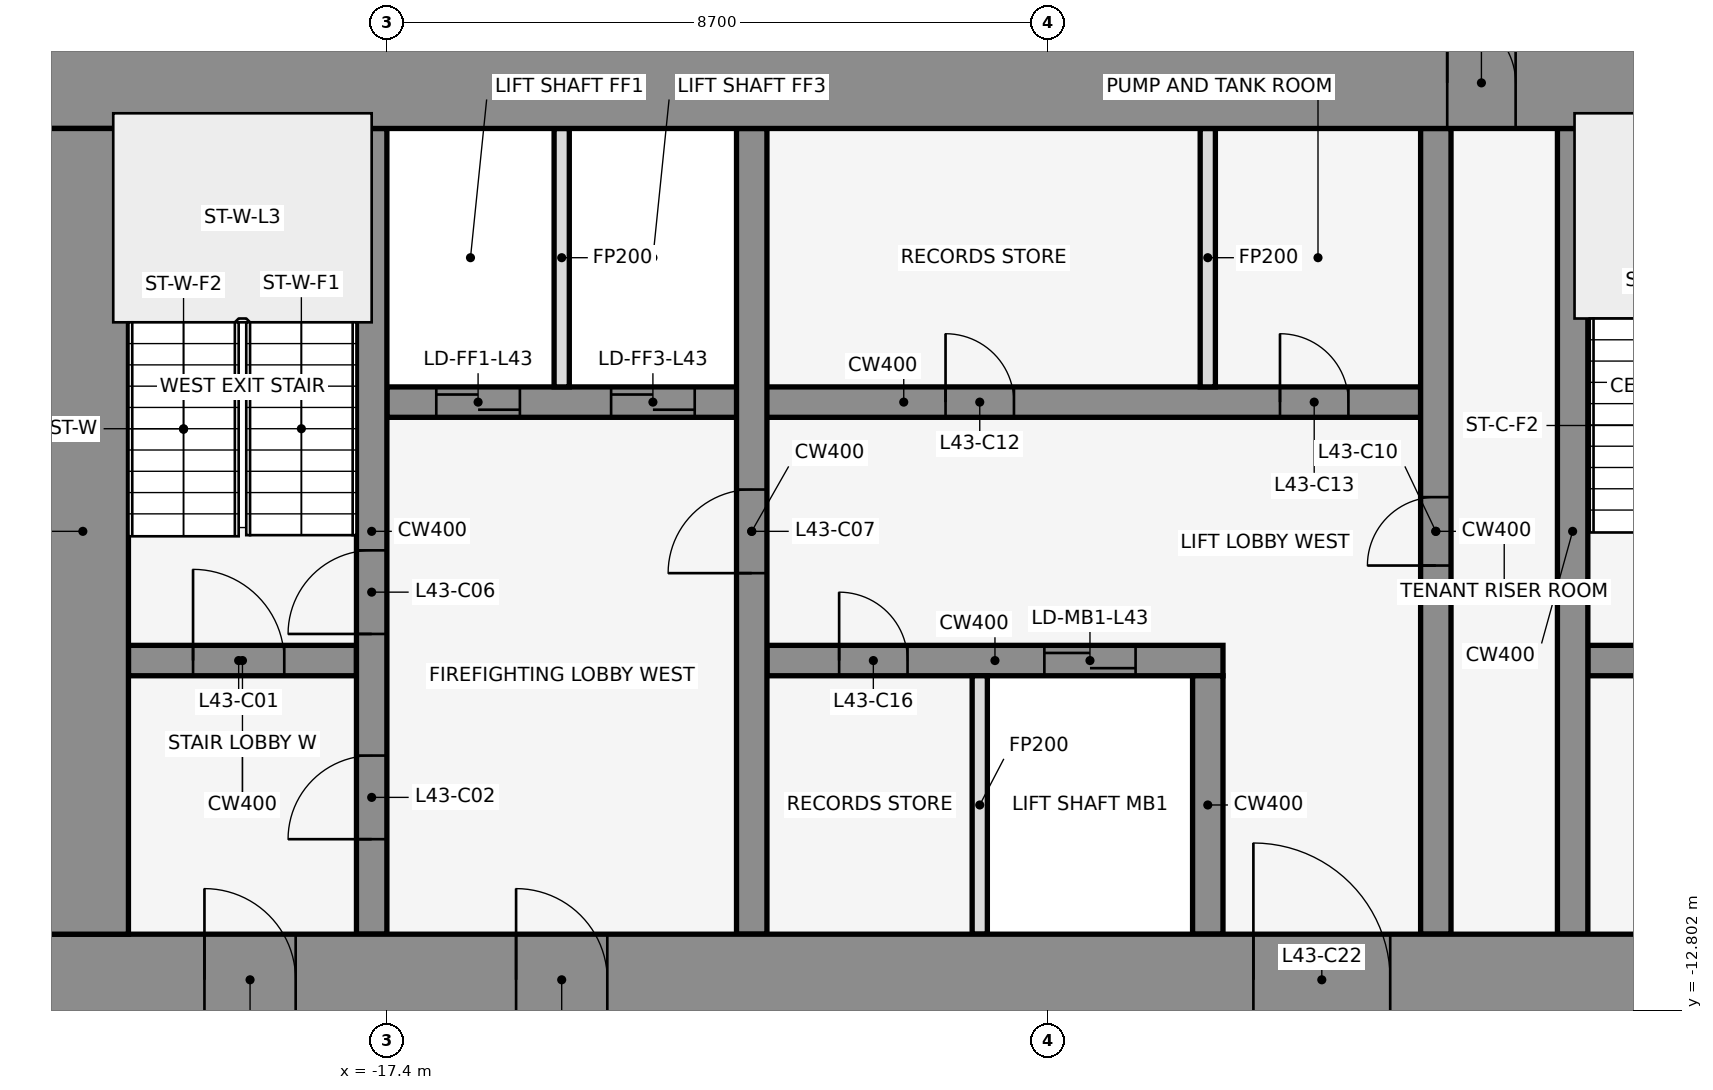
"""IFC4 building model, lengths in metres.
Left out: names, types, materials, properties, quantities, classifications, styles, units other than length and angle.
Written with IfcOpenShell. Run it as: python <this file> out.ifc"""

import sys

from ifc_helpers import new_model, si_unit, direction, frame, frame_2d, origin, place, context, subcontext, project, spatial, rectangle, extrude, element, fill, save


model = new_model("IFC4")
c1 = context("Model", 3, precision=1e-05, world=origin(), true_north=direction((0.0, 1.0)))
c2 = subcontext(c1, "Body", "Model", "MODEL_VIEW")
j1 = project(units=[si_unit("LENGTHUNIT", "METRE"), si_unit("PLANEANGLEUNIT", "RADIAN")], contexts=[c1])
p1 = place(None, origin())
s1 = spatial("IfcSite", under=j1, at=p1, CompositionType="ELEMENT")
p2 = place(p1, origin())
s2 = spatial("IfcBuilding", under=s1, at=p2, CompositionType="ELEMENT")
p3 = place(p2, frame((0.0, 0.0, 195.0)))
s3 = spatial("IfcBuildingStorey", under=s2, at=p3, CompositionType="ELEMENT", Elevation=195.0)
for number, where, z_axis, x_axis in (
    (1, (-0.068, -0.105, 0.0), (0.0, 0.0, 1.0), (-0.84, 0.543, 0.0)),
    (2, (-14.599, 1.08, 0.0), (0.0, 0.0, 1.0), (-0.84, -0.543, 0.0)),
):
    element("IfcWall", number, at=place(p3, frame(where, z_axis=z_axis, x_axis=x_axis)), inside=s3, PredefinedType="STANDARD", context=c2, shape_type="SweptSolid", body=[
        extrude(rectangle(XDim=2.183, YDim=0.25, at=frame_2d((1.091, 0.0))), origin(), (0.0, 0.0, 1.0), 3.95),
    ])
p4 = place(p3, frame((-20.8, -8.2, 0.0), z_axis=(0.0, 0.0, 1.0), x_axis=(1.0, 0.0, 0.0)))
e3 = element("IfcWall", 3, at=p4, inside=s3, PredefinedType="SHEAR", context=c2, shape_type="SweptSolid", body=[
    extrude(rectangle(XDim=3.0, YDim=0.4, at=frame_2d((1.5, 0.0))), origin(), (0.0, 0.0, 1.0), 4.1),
])
p5 = place(p4, frame((0.85, 0.0, 0.0)))
e4 = element("IfcOpeningElement", 4, at=p5, cuts=e3, PredefinedType="OPENING", context=c2, shape_type="SweptSolid", body=[
    extrude(rectangle(XDim=1.2, YDim=2.1, at=frame_2d((0.6, 1.05))), frame((0.0, 0.212, 0.0), z_axis=(0.0, -1.0, 0.0), x_axis=(1.0, 0.0, 0.0)), (0.0, 0.0, 1.0), 0.424),
])
p6 = place(p3, frame((-12.4, -8.2, 0.0), z_axis=(0.0, 0.0, 1.0), x_axis=(1.0, 0.0, 0.0)))
e5 = element("IfcWall", 5, at=p6, inside=s3, PredefinedType="SHEAR", context=c2, shape_type="SweptSolid", body=[
    extrude(rectangle(XDim=6.0, YDim=0.4, at=frame_2d((3.0, 0.0))), origin(), (0.0, 0.0, 1.0), 4.1),
])
p7 = place(p6, frame((3.65, 0.0, 0.0)))
e6 = element("IfcOpeningElement", 6, at=p7, cuts=e5, PredefinedType="OPENING", context=c2, shape_type="SweptSolid", body=[
    extrude(rectangle(XDim=1.2, YDim=2.1, at=frame_2d((0.6, 1.05))), frame((0.0, 0.212, 0.0), z_axis=(0.0, -1.0, 0.0), x_axis=(1.0, 0.0, 0.0)), (0.0, 0.0, 1.0), 0.424),
])
p8 = place(p6, frame((0.95, 0.0, 0.0)))
e7 = element("IfcOpeningElement", 7, at=p8, cuts=e5, PredefinedType="OPENING", context=c2, shape_type="SweptSolid", body=[
    extrude(rectangle(XDim=0.9, YDim=2.1, at=frame_2d((0.45, 1.05))), frame((0.0, 0.212, 0.0), z_axis=(0.0, -1.0, 0.0), x_axis=(1.0, 0.0, 0.0)), (0.0, 0.0, 1.0), 0.424),
])
p9 = place(p3, frame((-1.6, -8.2, 0.0), z_axis=(0.0, 0.0, 1.0), x_axis=(1.0, 0.0, 0.0)))
e8 = element("IfcWall", 8, at=p9, inside=s3, PredefinedType="SHEAR", context=c2, shape_type="SweptSolid", body=[
    extrude(rectangle(XDim=3.2, YDim=0.4, at=frame_2d((1.6, 0.0))), origin(), (0.0, 0.0, 1.0), 4.1),
])
p10 = place(p9, frame((1.05, 0.0, 0.0)))
e9 = element("IfcOpeningElement", 9, at=p10, cuts=e8, PredefinedType="OPENING", context=c2, shape_type="SweptSolid", body=[
    extrude(rectangle(XDim=1.2, YDim=2.1, at=frame_2d((0.6, 1.05))), frame((0.0, 0.212, 0.0), z_axis=(0.0, -1.0, 0.0), x_axis=(1.0, 0.0, 0.0)), (0.0, 0.0, 1.0), 0.424),
])
p11 = place(p3, frame((-17.4, -4.8, 0.0), z_axis=(0.0, 0.0, 1.0), x_axis=(1.0, 0.0, 0.0)))
e10 = element("IfcWall", 10, at=p11, inside=s3, PredefinedType="SHEAR", context=c2, shape_type="SweptSolid", body=[
    extrude(rectangle(XDim=13.6, YDim=0.4, at=frame_2d((6.8, 0.0))), origin(), (0.0, 0.0, 1.0), 4.1),
])
p12 = place(p11, frame((0.65, 0.0, 0.0)))
e11 = element("IfcOpeningElement", 11, at=p12, cuts=e10, PredefinedType="OPENING", context=c2, shape_type="SweptSolid", body=[
    extrude(rectangle(XDim=1.1, YDim=2.1, at=frame_2d((0.55, 1.05))), frame((0.0, 0.212, 0.0), z_axis=(0.0, -1.0, 0.0), x_axis=(1.0, 0.0, 0.0)), (0.0, 0.0, 1.0), 0.424),
])
p13 = place(p11, frame((2.95, 0.0, 0.0)))
e12 = element("IfcOpeningElement", 12, at=p13, cuts=e10, PredefinedType="OPENING", context=c2, shape_type="SweptSolid", body=[
    extrude(rectangle(XDim=1.1, YDim=2.1, at=frame_2d((0.55, 1.05))), frame((0.0, 0.212, 0.0), z_axis=(0.0, -1.0, 0.0), x_axis=(1.0, 0.0, 0.0)), (0.0, 0.0, 1.0), 0.424),
])
p14 = place(p11, frame((7.35, 0.0, 0.0)))
e13 = element("IfcOpeningElement", 13, at=p14, cuts=e10, PredefinedType="OPENING", context=c2, shape_type="SweptSolid", body=[
    extrude(rectangle(XDim=0.9, YDim=2.1, at=frame_2d((0.45, 1.05))), frame((0.0, 0.212, 0.0), z_axis=(0.0, -1.0, 0.0), x_axis=(1.0, 0.0, 0.0)), (0.0, 0.0, 1.0), 0.424),
])
p15 = place(p11, frame((11.75, 0.0, 0.0)))
e14 = element("IfcOpeningElement", 14, at=p15, cuts=e10, PredefinedType="OPENING", context=c2, shape_type="SweptSolid", body=[
    extrude(rectangle(XDim=0.9, YDim=2.1, at=frame_2d((0.45, 1.05))), frame((0.0, 0.212, 0.0), z_axis=(0.0, -1.0, 0.0), x_axis=(1.0, 0.0, 0.0)), (0.0, 0.0, 1.0), 0.424),
])
p16 = place(p3, frame((-17.6, -11.8, 0.0), z_axis=(0.0, 0.0, 1.0), x_axis=(0.0, 1.0, 0.0)))
e15 = element("IfcWall", 15, at=p16, inside=s3, PredefinedType="SHEAR", context=c2, shape_type="SweptSolid", body=[
    extrude(rectangle(XDim=10.6, YDim=0.4, at=frame_2d((5.3, 0.0))), origin(), (0.0, 0.0, 1.0), 4.1),
])
p17 = place(p16, frame((1.25, 0.0, 0.0)))
e16 = element("IfcOpeningElement", 16, at=p17, cuts=e15, PredefinedType="OPENING", context=c2, shape_type="SweptSolid", body=[
    extrude(rectangle(XDim=1.1, YDim=2.1, at=frame_2d((0.55, 1.05))), frame((0.0, 0.212, 0.0), z_axis=(0.0, -1.0, 0.0), x_axis=(1.0, 0.0, 0.0)), (0.0, 0.0, 1.0), 0.424),
])
p18 = place(p16, frame((3.95, 0.0, 0.0)))
e17 = element("IfcOpeningElement", 17, at=p18, cuts=e15, PredefinedType="OPENING", context=c2, shape_type="SweptSolid", body=[
    extrude(rectangle(XDim=1.1, YDim=2.1, at=frame_2d((0.55, 1.05))), frame((0.0, 0.212, 0.0), z_axis=(0.0, -1.0, 0.0), x_axis=(1.0, 0.0, 0.0)), (0.0, 0.0, 1.0), 0.424),
])
p19 = place(p3, frame((-15.1, -4.6, 0.0), z_axis=(0.0, 0.0, 1.0), x_axis=(0.0, 1.0, 0.0)))
e18 = element("IfcWall", 18, at=p19, inside=s3, PredefinedType="PARTITIONING", context=c2, shape_type="SweptSolid", body=[
    extrude(rectangle(XDim=3.4, YDim=0.2, at=frame_2d((1.7, 0.0))), origin(), (0.0, 0.0, 1.0), 2.84),
])
p20 = place(p3, frame((-12.6, -11.8, 0.0), z_axis=(0.0, 0.0, 1.0), x_axis=(0.0, 1.0, 0.0)))
e19 = element("IfcWall", 19, at=p20, inside=s3, PredefinedType="SHEAR", context=c2, shape_type="SweptSolid", body=[
    extrude(rectangle(XDim=10.6, YDim=0.4, at=frame_2d((5.3, 0.0))), origin(), (0.0, 0.0, 1.0), 4.1),
])
p21 = place(p20, frame((4.75, 0.0, 0.0)))
e20 = element("IfcOpeningElement", 20, at=p21, cuts=e19, PredefinedType="OPENING", context=c2, shape_type="SweptSolid", body=[
    extrude(rectangle(XDim=1.1, YDim=2.1, at=frame_2d((0.55, 1.05))), frame((0.0, 0.212, 0.0), z_axis=(0.0, -1.0, 0.0), x_axis=(1.0, 0.0, 0.0)), (0.0, 0.0, 1.0), 0.424),
])
p22 = place(p3, frame((-9.6, -11.8, 0.0), z_axis=(0.0, 0.0, 1.0), x_axis=(0.0, 1.0, 0.0)))
e21 = element("IfcWall", 21, at=p22, inside=s3, PredefinedType="PARTITIONING", context=c2, shape_type="SweptSolid", body=[
    extrude(rectangle(XDim=3.4, YDim=0.2, at=frame_2d((1.7, 0.0))), origin(), (0.0, 0.0, 1.0), 2.84),
])
p23 = place(p3, frame((-6.6, -11.8, 0.0), z_axis=(0.0, 0.0, 1.0), x_axis=(0.0, 1.0, 0.0)))
e22 = element("IfcWall", 22, at=p23, inside=s3, PredefinedType="SHEAR", context=c2, shape_type="SweptSolid", body=[
    extrude(rectangle(XDim=3.4, YDim=0.4, at=frame_2d((1.7, 0.0))), origin(), (0.0, 0.0, 1.0), 4.1),
])
p24 = place(p3, frame((-6.6, -4.6, 0.0), z_axis=(0.0, 0.0, 1.0), x_axis=(0.0, 1.0, 0.0)))
e23 = element("IfcWall", 23, at=p24, inside=s3, PredefinedType="PARTITIONING", context=c2, shape_type="SweptSolid", body=[
    extrude(rectangle(XDim=3.4, YDim=0.2, at=frame_2d((1.7, 0.0))), origin(), (0.0, 0.0, 1.0), 2.84),
])
p25 = place(p3, frame((-3.6, -11.8, 0.0), z_axis=(0.0, 0.0, 1.0), x_axis=(0.0, 1.0, 0.0)))
e24 = element("IfcWall", 24, at=p25, inside=s3, PredefinedType="SHEAR", context=c2, shape_type="SweptSolid", body=[
    extrude(rectangle(XDim=10.6, YDim=0.4, at=frame_2d((5.3, 0.0))), origin(), (0.0, 0.0, 1.0), 4.1),
])
p26 = place(p25, frame((4.85, 0.0, 0.0)))
e25 = element("IfcOpeningElement", 25, at=p26, cuts=e24, PredefinedType="OPENING", context=c2, shape_type="SweptSolid", body=[
    extrude(rectangle(XDim=0.9, YDim=2.1, at=frame_2d((0.45, 1.05))), frame((0.0, 0.212, 0.0), z_axis=(0.0, -1.0, 0.0), x_axis=(1.0, 0.0, 0.0)), (0.0, 0.0, 1.0), 0.424),
])
p27 = place(p3, frame((-1.8, -11.8, 0.0), z_axis=(0.0, 0.0, 1.0), x_axis=(0.0, 1.0, 0.0)))
e26 = element("IfcWall", 26, at=p27, inside=s3, PredefinedType="SHEAR", context=c2, shape_type="SweptSolid", body=[
    extrude(rectangle(XDim=10.6, YDim=0.4, at=frame_2d((5.3, 0.0))), origin(), (0.0, 0.0, 1.0), 4.1),
])
p28 = place(p3, frame((-22.0, -0.6, 0.0), z_axis=(0.0, 0.0, 1.0), x_axis=(1.0, 0.0, 0.0)))
e27 = element("IfcWall", 27, at=p28, inside=s3, PredefinedType="SHEAR", context=c2, shape_type="SweptSolid", body=[
    extrude(rectangle(XDim=44.0, YDim=1.2, at=frame_2d((22.0, 0.0))), origin(), (0.0, 0.0, 1.0), 4.1),
])
p29 = place(p28, frame((18.55, 0.0, 0.0)))
e28 = element("IfcOpeningElement", 28, at=p29, cuts=e27, PredefinedType="OPENING", context=c2, shape_type="SweptSolid", body=[
    extrude(rectangle(XDim=0.9, YDim=2.1, at=frame_2d((0.45, 1.05))), frame((0.0, 0.612, 0.0), z_axis=(0.0, -1.0, 0.0), x_axis=(1.0, 0.0, 0.0)), (0.0, 0.0, 1.0), 1.224),
])
p30 = place(p28, frame((24.55, 0.0, 0.0)))
e29 = element("IfcOpeningElement", 29, at=p30, cuts=e27, PredefinedType="OPENING", context=c2, shape_type="SweptSolid", body=[
    extrude(rectangle(XDim=0.9, YDim=2.1, at=frame_2d((0.45, 1.05))), frame((0.0, 0.612, 0.0), z_axis=(0.0, -1.0, 0.0), x_axis=(1.0, 0.0, 0.0)), (0.0, 0.0, 1.0), 1.224),
])
p31 = place(p3, frame((-22.0, -12.4, 0.0), z_axis=(0.0, 0.0, 1.0), x_axis=(1.0, 0.0, 0.0)))
e30 = element("IfcWall", 30, at=p31, inside=s3, PredefinedType="SHEAR", context=c2, shape_type="SweptSolid", body=[
    extrude(rectangle(XDim=44.0, YDim=1.2, at=frame_2d((22.0, 0.0))), origin(), (0.0, 0.0, 1.0), 4.1),
])
p32 = place(p31, frame((2.2, 0.0, 0.0)))
e31 = element("IfcOpeningElement", 31, at=p32, cuts=e30, PredefinedType="OPENING", context=c2, shape_type="SweptSolid", body=[
    extrude(rectangle(XDim=1.2, YDim=2.1, at=frame_2d((0.6, 1.05))), frame((0.0, 0.612, 0.0), z_axis=(0.0, -1.0, 0.0), x_axis=(1.0, 0.0, 0.0)), (0.0, 0.0, 1.0), 1.224),
])
p33 = place(p31, frame((21.4, 0.0, 0.0)))
e32 = element("IfcOpeningElement", 32, at=p33, cuts=e30, PredefinedType="OPENING", context=c2, shape_type="SweptSolid", body=[
    extrude(rectangle(XDim=1.2, YDim=2.1, at=frame_2d((0.6, 1.05))), frame((0.0, 0.612, 0.0), z_axis=(0.0, -1.0, 0.0), x_axis=(1.0, 0.0, 0.0)), (0.0, 0.0, 1.0), 1.224),
])
p34 = place(p31, frame((40.6, 0.0, 0.0)))
e33 = element("IfcOpeningElement", 33, at=p34, cuts=e30, PredefinedType="OPENING", context=c2, shape_type="SweptSolid", body=[
    extrude(rectangle(XDim=1.2, YDim=2.1, at=frame_2d((0.6, 1.05))), frame((0.0, 0.612, 0.0), z_axis=(0.0, -1.0, 0.0), x_axis=(1.0, 0.0, 0.0)), (0.0, 0.0, 1.0), 1.224),
])
p35 = place(p31, frame((16.0, 0.0, 0.0)))
e34 = element("IfcOpeningElement", 34, at=p35, cuts=e30, PredefinedType="OPENING", context=c2, shape_type="SweptSolid", body=[
    extrude(rectangle(XDim=1.8, YDim=2.1, at=frame_2d((0.9, 1.05))), frame((0.0, 0.612, 0.0), z_axis=(0.0, -1.0, 0.0), x_axis=(1.0, 0.0, 0.0)), (0.0, 0.0, 1.0), 1.224),
])
p36 = place(p31, frame((6.3, 0.0, 0.0)))
e35 = element("IfcOpeningElement", 35, at=p36, cuts=e30, PredefinedType="OPENING", context=c2, shape_type="SweptSolid", body=[
    extrude(rectangle(XDim=1.2, YDim=2.1, at=frame_2d((0.6, 1.05))), frame((0.0, 0.612, 0.0), z_axis=(0.0, -1.0, 0.0), x_axis=(1.0, 0.0, 0.0)), (0.0, 0.0, 1.0), 1.224),
])
p37 = place(p31, frame((26.2, 0.0, 0.0)))
e36 = element("IfcOpeningElement", 36, at=p37, cuts=e30, PredefinedType="OPENING", context=c2, shape_type="SweptSolid", body=[
    extrude(rectangle(XDim=1.8, YDim=2.1, at=frame_2d((0.9, 1.05))), frame((0.0, 0.612, 0.0), z_axis=(0.0, -1.0, 0.0), x_axis=(1.0, 0.0, 0.0)), (0.0, 0.0, 1.0), 1.224),
])
p38 = place(p31, frame((36.5, 0.0, 0.0)))
e37 = element("IfcOpeningElement", 37, at=p38, cuts=e30, PredefinedType="OPENING", context=c2, shape_type="SweptSolid", body=[
    extrude(rectangle(XDim=1.2, YDim=2.1, at=frame_2d((0.6, 1.05))), frame((0.0, 0.612, 0.0), z_axis=(0.0, -1.0, 0.0), x_axis=(1.0, 0.0, 0.0)), (0.0, 0.0, 1.0), 1.224),
])
p39 = place(p3, frame((-21.4, -11.8, 0.0), z_axis=(0.0, 0.0, 1.0), x_axis=(0.0, 1.0, 0.0)))
e38 = element("IfcWall", 38, at=p39, inside=s3, PredefinedType="SHEAR", context=c2, shape_type="SweptSolid", body=[
    extrude(rectangle(XDim=10.6, YDim=1.2, at=frame_2d((5.3, 0.0))), origin(), (0.0, 0.0, 1.0), 4.1),
])
p40 = place(p5, origin())
e39 = element("IfcDoor", 39, at=p40, inside=s3, OperationType="SINGLE_SWING_LEFT", PredefinedType="DOOR", context=c2, shape_type="SweptSolid", body=[
    extrude(rectangle(XDim=1.2, YDim=2.1, at=frame_2d((0.6, 1.05))), frame((0.0, 0.025, 0.0), z_axis=(0.0, -1.0, 0.0), x_axis=(1.0, 0.0, 0.0)), (0.0, 0.0, 1.0), 0.05),
])
fill(e4, e39)
p41 = place(p17, frame((1.1, 0.0, 0.0), z_axis=(0.0, 0.0, 1.0), x_axis=(-1.0, 0.0, 0.0)))
e40 = element("IfcDoor", 40, at=p41, inside=s3, OperationType="SINGLE_SWING_LEFT", PredefinedType="DOOR", context=c2, shape_type="SweptSolid", body=[
    extrude(rectangle(XDim=1.1, YDim=2.1, at=frame_2d((0.55, 1.05))), frame((0.0, 0.025, 0.0), z_axis=(0.0, -1.0, 0.0), x_axis=(1.0, 0.0, 0.0)), (0.0, 0.0, 1.0), 0.05),
])
fill(e16, e40)
p42 = place(p12, origin())
e41 = element("IfcDoor", 41, at=p42, inside=s3, OperationType="DOUBLE_DOOR_SLIDING", PredefinedType="DOOR", context=c2, shape_type="SweptSolid", body=[
    extrude(rectangle(XDim=1.1, YDim=2.1, at=frame_2d((0.55, 1.05))), frame((0.0, 0.025, 0.0), z_axis=(0.0, -1.0, 0.0), x_axis=(1.0, 0.0, 0.0)), (0.0, 0.0, 1.0), 0.05),
])
fill(e11, e41)
p43 = place(p13, origin())
e42 = element("IfcDoor", 42, at=p43, inside=s3, OperationType="DOUBLE_DOOR_SLIDING", PredefinedType="DOOR", context=c2, shape_type="SweptSolid", body=[
    extrude(rectangle(XDim=1.1, YDim=2.1, at=frame_2d((0.55, 1.05))), frame((0.0, 0.025, 0.0), z_axis=(0.0, -1.0, 0.0), x_axis=(1.0, 0.0, 0.0)), (0.0, 0.0, 1.0), 0.05),
])
fill(e12, e42)
p44 = place(p7, origin())
e43 = element("IfcDoor", 43, at=p44, inside=s3, OperationType="DOUBLE_DOOR_SLIDING", PredefinedType="DOOR", context=c2, shape_type="SweptSolid", body=[
    extrude(rectangle(XDim=1.2, YDim=2.1, at=frame_2d((0.6, 1.05))), frame((0.0, 0.025, 0.0), z_axis=(0.0, -1.0, 0.0), x_axis=(1.0, 0.0, 0.0)), (0.0, 0.0, 1.0), 0.05),
])
fill(e6, e43)
p45 = place(p18, frame((1.1, 0.0, 0.0), z_axis=(0.0, 0.0, 1.0), x_axis=(-1.0, 0.0, 0.0)))
e44 = element("IfcDoor", 44, at=p45, inside=s3, OperationType="SINGLE_SWING_LEFT", PredefinedType="DOOR", context=c2, shape_type="SweptSolid", body=[
    extrude(rectangle(XDim=1.1, YDim=2.1, at=frame_2d((0.55, 1.05))), frame((0.0, 0.025, 0.0), z_axis=(0.0, -1.0, 0.0), x_axis=(1.0, 0.0, 0.0)), (0.0, 0.0, 1.0), 0.05),
])
fill(e17, e44)
p46 = place(p21, origin())
e45 = element("IfcDoor", 45, at=p46, inside=s3, OperationType="SINGLE_SWING_LEFT", PredefinedType="DOOR", context=c2, shape_type="SweptSolid", body=[
    extrude(rectangle(XDim=1.1, YDim=2.1, at=frame_2d((0.55, 1.05))), frame((0.0, 0.025, 0.0), z_axis=(0.0, -1.0, 0.0), x_axis=(1.0, 0.0, 0.0)), (0.0, 0.0, 1.0), 0.05),
])
fill(e20, e45)
p47 = place(p26, frame((0.9, 0.0, 0.0), z_axis=(0.0, 0.0, 1.0), x_axis=(-1.0, 0.0, 0.0)))
e46 = element("IfcDoor", 46, at=p47, inside=s3, OperationType="SINGLE_SWING_LEFT", PredefinedType="DOOR", context=c2, shape_type="SweptSolid", body=[
    extrude(rectangle(XDim=0.9, YDim=2.1, at=frame_2d((0.45, 1.05))), frame((0.0, 0.025, 0.0), z_axis=(0.0, -1.0, 0.0), x_axis=(1.0, 0.0, 0.0)), (0.0, 0.0, 1.0), 0.05),
])
fill(e25, e46)
p48 = place(p14, origin())
e47 = element("IfcDoor", 47, at=p48, inside=s3, OperationType="SINGLE_SWING_RIGHT", PredefinedType="DOOR", context=c2, shape_type="SweptSolid", body=[
    extrude(rectangle(XDim=0.9, YDim=2.1, at=frame_2d((0.45, 1.05))), frame((0.0, 0.025, 0.0), z_axis=(0.0, -1.0, 0.0), x_axis=(1.0, 0.0, 0.0)), (0.0, 0.0, 1.0), 0.05),
])
fill(e13, e47)
p49 = place(p15, origin())
e48 = element("IfcDoor", 48, at=p49, inside=s3, OperationType="SINGLE_SWING_LEFT", PredefinedType="DOOR", context=c2, shape_type="SweptSolid", body=[
    extrude(rectangle(XDim=0.9, YDim=2.1, at=frame_2d((0.45, 1.05))), frame((0.0, 0.025, 0.0), z_axis=(0.0, -1.0, 0.0), x_axis=(1.0, 0.0, 0.0)), (0.0, 0.0, 1.0), 0.05),
])
fill(e14, e48)
p50 = place(p8, frame((0.9, 0.0, 0.0), z_axis=(0.0, 0.0, 1.0), x_axis=(-1.0, 0.0, 0.0)))
e49 = element("IfcDoor", 49, at=p50, inside=s3, OperationType="SINGLE_SWING_LEFT", PredefinedType="DOOR", context=c2, shape_type="SweptSolid", body=[
    extrude(rectangle(XDim=0.9, YDim=2.1, at=frame_2d((0.45, 1.05))), frame((0.0, 0.025, 0.0), z_axis=(0.0, -1.0, 0.0), x_axis=(1.0, 0.0, 0.0)), (0.0, 0.0, 1.0), 0.05),
])
fill(e7, e49)
p51 = place(p29, origin())
e50 = element("IfcDoor", 50, at=p51, inside=s3, OperationType="SINGLE_SWING_LEFT", PredefinedType="DOOR", context=c2, shape_type="SweptSolid", body=[
    extrude(rectangle(XDim=0.9, YDim=2.1, at=frame_2d((0.45, 1.05))), frame((0.0, 0.025, 0.0), z_axis=(0.0, -1.0, 0.0), x_axis=(1.0, 0.0, 0.0)), (0.0, 0.0, 1.0), 0.05),
])
fill(e28, e50)
p52 = place(p32, frame((1.2, 0.0, 0.0), z_axis=(0.0, 0.0, 1.0), x_axis=(-1.0, 0.0, 0.0)))
e51 = element("IfcDoor", 51, at=p52, inside=s3, OperationType="SINGLE_SWING_RIGHT", PredefinedType="DOOR", context=c2, shape_type="SweptSolid", body=[
    extrude(rectangle(XDim=1.2, YDim=2.1, at=frame_2d((0.6, 1.05))), frame((0.0, 0.025, 0.0), z_axis=(0.0, -1.0, 0.0), x_axis=(1.0, 0.0, 0.0)), (0.0, 0.0, 1.0), 0.05),
])
fill(e31, e51)
p53 = place(p35, origin())
e52 = element("IfcDoor", 52, at=p53, inside=s3, OperationType="SINGLE_SWING_LEFT", PredefinedType="DOOR", context=c2, shape_type="SweptSolid", body=[
    extrude(rectangle(XDim=1.8, YDim=2.1, at=frame_2d((0.9, 1.05))), frame((0.0, 0.025, 0.0), z_axis=(0.0, -1.0, 0.0), x_axis=(1.0, 0.0, 0.0)), (0.0, 0.0, 1.0), 0.05),
])
fill(e34, e52)
p54 = place(p36, frame((1.2, 0.0, 0.0), z_axis=(0.0, 0.0, 1.0), x_axis=(-1.0, 0.0, 0.0)))
e53 = element("IfcDoor", 53, at=p54, inside=s3, OperationType="SINGLE_SWING_RIGHT", PredefinedType="DOOR", context=c2, shape_type="SweptSolid", body=[
    extrude(rectangle(XDim=1.2, YDim=2.1, at=frame_2d((0.6, 1.05))), frame((0.0, 0.025, 0.0), z_axis=(0.0, -1.0, 0.0), x_axis=(1.0, 0.0, 0.0)), (0.0, 0.0, 1.0), 0.05),
])
fill(e35, e53)
save(model, sys.argv[1])
